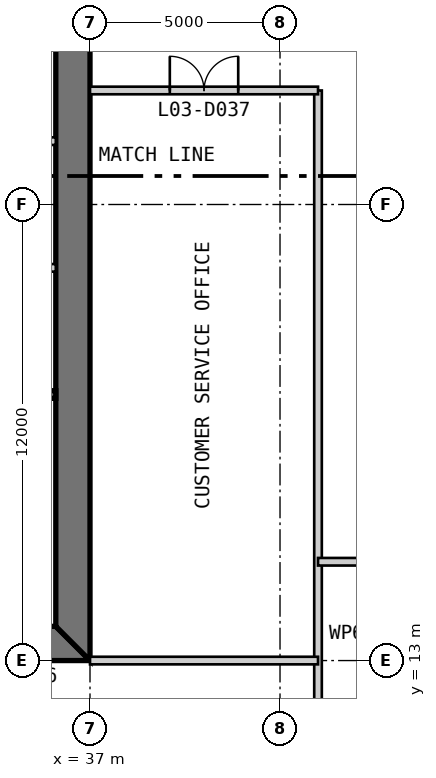
"""IFC4 building model, lengths in metres.
Left out: names, types, materials, properties, quantities, classifications, styles, units other than length and angle.
Written with IfcOpenShell. Run it as: python <this file> out.ifc"""

import sys

from ifc_helpers import new_model, si_unit, direction, frame, frame_2d, origin, place, context, subcontext, project, spatial, polyline, rectangle, outline, extrude, element, fill, save


model = new_model("IFC4")
c1 = context("Model", 3, precision=1e-05, world=origin(), true_north=direction((0.0, 1.0)))
c2 = subcontext(c1, "Body", "Model", "MODEL_VIEW")
j1 = project(units=[si_unit("LENGTHUNIT", "METRE"), si_unit("PLANEANGLEUNIT", "RADIAN")], contexts=[c1])
p1 = place(None, origin())
s1 = spatial("IfcSite", under=j1, at=p1, CompositionType="ELEMENT")
p2 = place(p1, origin())
s2 = spatial("IfcBuilding", under=s1, at=p2, CompositionType="ELEMENT")
p3 = place(p2, frame((0.0, 0.0, 16.6)))
s3 = spatial("IfcBuildingStorey", under=s2, at=p3, CompositionType="ELEMENT", Elevation=16.6)
p4 = place(p3, frame((13.0, 13.45, 0.0), z_axis=(0.0, 0.0, 1.0), x_axis=(1.0, 0.0, 0.0)))
e1 = element("IfcWall", 1, at=p4, inside=s3, PredefinedType="SHEAR", context=c2, shape_type="SweptSolid", body=[
    extrude(outline(polyline([(0.0, -0.45), (24.0, -0.45), (23.1, 0.45), (0.9, 0.45), (0.0, -0.45)])), origin(), (0.0, 0.0, 1.0), 4.8),
])
p5 = place(p4, frame((4.9, 0.0, 0.0)))
e2 = element("IfcOpeningElement", 2, at=p5, cuts=e1, PredefinedType="OPENING", context=c2, shape_type="SweptSolid", body=[
    extrude(rectangle(XDim=1.0, YDim=2.2, at=frame_2d((0.5, 1.1))), frame((0.0, 0.46, 0.0), z_axis=(0.0, -1.0, 0.0), x_axis=(1.0, 0.0, 0.0)), (0.0, 0.0, 1.0), 0.92),
])
p6 = place(p4, frame((8.9, 0.0, 0.0)))
e3 = element("IfcOpeningElement", 3, at=p6, cuts=e1, PredefinedType="OPENING", context=c2, shape_type="SweptSolid", body=[
    extrude(rectangle(XDim=1.1, YDim=2.2, at=frame_2d((0.55, 1.1))), frame((0.0, 0.46, 0.0), z_axis=(0.0, -1.0, 0.0), x_axis=(1.0, 0.0, 0.0)), (0.0, 0.0, 1.0), 0.92),
])
p7 = place(p4, frame((15.05, 0.0, 0.0)))
e4 = element("IfcOpeningElement", 4, at=p7, cuts=e1, PredefinedType="OPENING", context=c2, shape_type="SweptSolid", body=[
    extrude(rectangle(XDim=0.9, YDim=2.2, at=frame_2d((0.45, 1.1))), frame((0.0, 0.46, 0.0), z_axis=(0.0, -1.0, 0.0), x_axis=(1.0, 0.0, 0.0)), (0.0, 0.0, 1.0), 0.92),
])
p8 = place(p4, frame((17.9, 0.0, 0.0)))
e5 = element("IfcOpeningElement", 5, at=p8, cuts=e1, PredefinedType="OPENING", context=c2, shape_type="SweptSolid", body=[
    extrude(rectangle(XDim=1.0, YDim=2.2, at=frame_2d((0.5, 1.1))), frame((0.0, 0.46, 0.0), z_axis=(0.0, -1.0, 0.0), x_axis=(1.0, 0.0, 0.0)), (0.0, 0.0, 1.0), 0.92),
])
p9 = place(p4, frame((21.4, 0.0, 0.0)))
e6 = element("IfcOpeningElement", 6, at=p9, cuts=e1, PredefinedType="OPENING", context=c2, shape_type="SweptSolid", body=[
    extrude(rectangle(XDim=1.0, YDim=2.2, at=frame_2d((0.5, 1.1))), frame((0.0, 0.46, 0.0), z_axis=(0.0, -1.0, 0.0), x_axis=(1.0, 0.0, 0.0)), (0.0, 0.0, 1.0), 0.92),
])
p10 = place(p3, frame((36.55, 13.9, 0.0), z_axis=(0.0, 0.0, 1.0), x_axis=(0.0, 1.0, 0.0)))
e7 = element("IfcWall", 7, at=p10, inside=s3, PredefinedType="SHEAR", context=c2, shape_type="SweptSolid", body=[
    extrude(outline(polyline([(-0.9, -0.45), (23.1, -0.45), (22.2, 0.45), (0.0, 0.45), (-0.9, -0.45)])), origin(), (0.0, 0.0, 1.0), 4.8),
])
p11 = place(p10, frame((20.2, 0.0, 0.0)))
e8 = element("IfcOpeningElement", 8, at=p11, cuts=e7, PredefinedType="OPENING", context=c2, shape_type="SweptSolid", body=[
    extrude(rectangle(XDim=1.0, YDim=2.2, at=frame_2d((0.5, 1.1))), frame((0.0, 0.46, 0.0), z_axis=(0.0, -1.0, 0.0), x_axis=(1.0, 0.0, 0.0)), (0.0, 0.0, 1.0), 0.92),
])
p12 = place(p10, frame((17.25, 0.0, 0.0)))
e9 = element("IfcOpeningElement", 9, at=p12, cuts=e7, PredefinedType="OPENING", context=c2, shape_type="SweptSolid", body=[
    extrude(rectangle(XDim=0.9, YDim=2.2, at=frame_2d((0.45, 1.1))), frame((0.0, 0.46, 0.0), z_axis=(0.0, -1.0, 0.0), x_axis=(1.0, 0.0, 0.0)), (0.0, 0.0, 1.0), 0.92),
])
p13 = place(p3, frame((20.3, 20.0, 0.0), z_axis=(0.0, 0.0, 1.0), x_axis=(1.0, 0.0, 0.0)))
e10 = element("IfcWall", 10, at=p13, inside=s3, PredefinedType="SOLIDWALL", context=c2, shape_type="SweptSolid", body=[
    extrude(rectangle(XDim=15.8, YDim=0.2, at=frame_2d((7.9, 0.0))), origin(), (0.0, 0.0, 1.0), 4.6),
])
for number, where, z_axis, x_axis in (
    (11, (36.1, 26.667, 0.0), (0.0, 0.0, 1.0), (-1.0, 0.0, 0.0)),
    (12, (36.1, 23.333, 0.0), (0.0, 0.0, 1.0), (-1.0, 0.0, 0.0)),
):
    element("IfcWall", number, at=place(p3, frame(where, z_axis=z_axis, x_axis=x_axis)), inside=s3, PredefinedType="PARTITIONING", context=c2, shape_type="SweptSolid", body=[
        extrude(rectangle(XDim=2.8, YDim=0.2, at=frame_2d((1.4, 0.0))), origin(), (0.0, 0.0, 1.0), 4.6),
    ])
p14 = place(p3, frame((43.0, -0.6, 0.0), z_axis=(0.0, 0.0, 1.0), x_axis=(0.0, 1.0, 0.0)))
e13 = element("IfcWall", 13, at=p14, inside=s3, PredefinedType="PARTITIONING", context=c2, shape_type="SweptSolid", body=[
    extrude(rectangle(XDim=28.6, YDim=0.2, at=frame_2d((14.3, 0.0))), origin(), (0.0, 0.0, 1.0), 3.843),
])
p15 = place(p3, frame((37.0, 13.0, 0.0), z_axis=(0.0, 0.0, 1.0), x_axis=(1.0, 0.0, 0.0)))
e14 = element("IfcWall", 14, at=p15, inside=s3, PredefinedType="PARTITIONING", context=c2, shape_type="SweptSolid", body=[
    extrude(rectangle(XDim=6.0, YDim=0.2, at=frame_2d((3.0, 0.0))), origin(), (0.0, 0.0, 1.0), 3.653),
])
p16 = place(p3, frame((43.0, 15.6, 0.0), z_axis=(0.0, 0.0, 1.0), x_axis=(1.0, 0.0, 0.0)))
e15 = element("IfcWall", 15, at=p16, inside=s3, PredefinedType="PARTITIONING", context=c2, shape_type="SweptSolid", body=[
    extrude(rectangle(XDim=14.25, YDim=0.2, at=frame_2d((7.125, 0.0))), origin(), (0.0, 0.0, 1.0), 4.5),
])
p17 = place(p16, frame((10.0, 0.0, 0.0)))
e16 = element("IfcOpeningElement", 16, at=p17, cuts=e15, PredefinedType="OPENING", context=c2, shape_type="SweptSolid", body=[
    extrude(rectangle(XDim=1.8, YDim=2.4, at=frame_2d((0.9, 1.2))), frame((0.0, 0.11, 0.0), z_axis=(0.0, -1.0, 0.0), x_axis=(1.0, 0.0, 0.0)), (0.0, 0.0, 1.0), 0.22),
])
p18 = place(p16, frame((2.925, 0.0, 0.0)))
e17 = element("IfcOpeningElement", 17, at=p18, cuts=e15, PredefinedType="OPENING", context=c2, shape_type="SweptSolid", body=[
    extrude(rectangle(XDim=1.8, YDim=2.4, at=frame_2d((0.9, 1.2))), frame((0.0, 0.11, 0.0), z_axis=(0.0, -1.0, 0.0), x_axis=(1.0, 0.0, 0.0)), (0.0, 0.0, 1.0), 0.22),
])
p19 = place(p3, frame((37.0, 28.0, 0.0), z_axis=(0.0, 0.0, 1.0), x_axis=(1.0, 0.0, 0.0)))
e18 = element("IfcWall", 18, at=p19, inside=s3, PredefinedType="PARTITIONING", context=c2, shape_type="SweptSolid", body=[
    extrude(rectangle(XDim=6.0, YDim=0.2, at=frame_2d((3.0, 0.0))), origin(), (0.0, 0.0, 1.0), 4.5),
])
p20 = place(p19, frame((2.1, 0.0, 0.0)))
e19 = element("IfcOpeningElement", 19, at=p20, cuts=e18, PredefinedType="OPENING", context=c2, shape_type="SweptSolid", body=[
    extrude(rectangle(XDim=1.8, YDim=2.4, at=frame_2d((0.9, 1.2))), frame((0.0, 0.11, 0.0), z_axis=(0.0, -1.0, 0.0), x_axis=(1.0, 0.0, 0.0)), (0.0, 0.0, 1.0), 0.22),
])
p21 = place(p20, origin())
e20 = element("IfcDoor", 20, at=p21, inside=s3, OperationType="DOUBLE_DOOR_SINGLE_SWING", PredefinedType="DOOR", context=c2, shape_type="SweptSolid", body=[
    extrude(rectangle(XDim=1.8, YDim=2.4, at=frame_2d((0.9, 1.2))), frame((0.0, 0.025, 0.0), z_axis=(0.0, -1.0, 0.0), x_axis=(1.0, 0.0, 0.0)), (0.0, 0.0, 1.0), 0.05),
])
fill(e19, e20)
save(model, sys.argv[1])
